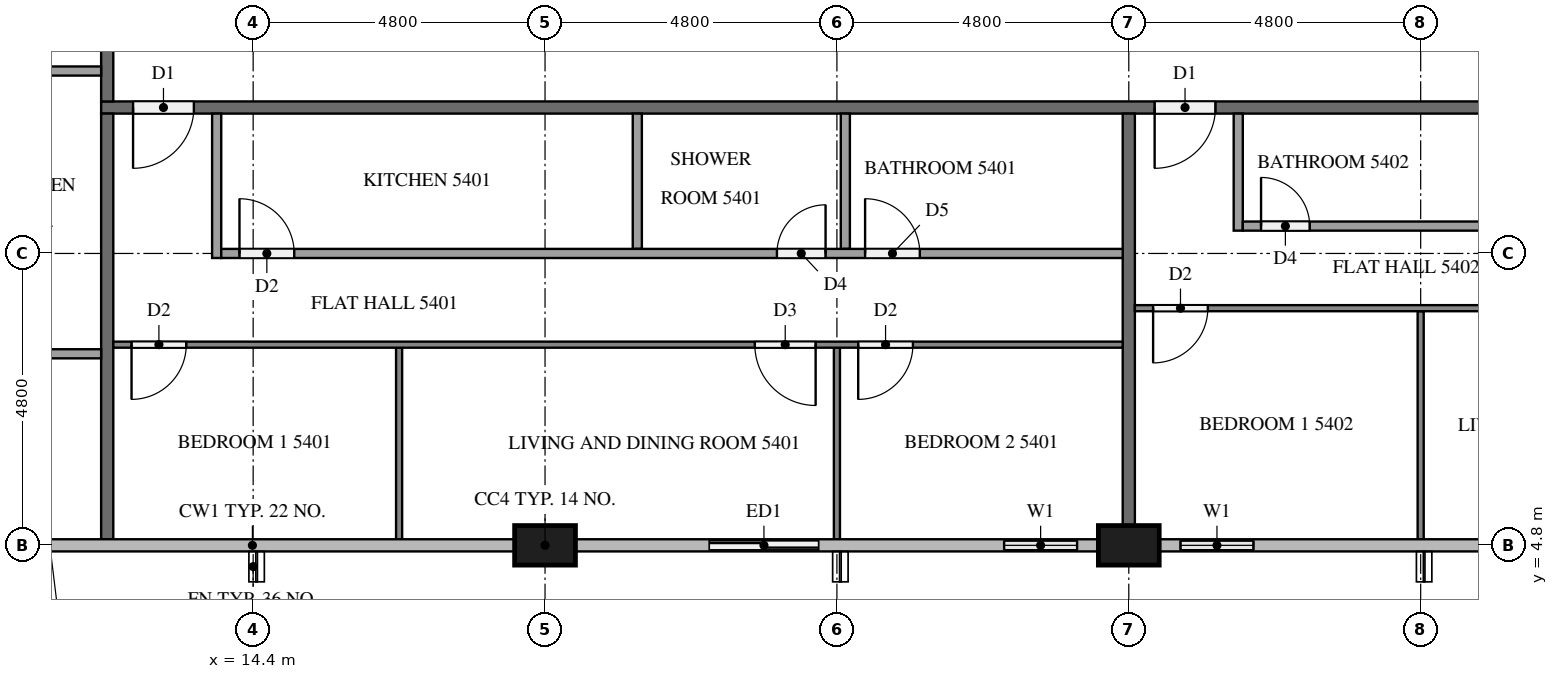
"""IFC4 building model, lengths in metres.
Left out: names, types, materials, properties, quantities, classifications, styles, units other than length and angle.
Written with IfcOpenShell. Run it as: python <this file> out.ifc"""

import sys

from ifc_helpers import new_model, si_unit, direction, frame, frame_2d, origin, origin_2d, place, context, subcontext, project, spatial, rectangle, extrude, element, fill, save


model = new_model("IFC4")
c1 = context("Model", 3, precision=1e-05, world=origin(), true_north=direction((0.0, 1.0)))
c2 = subcontext(c1, "Body", "Model", "MODEL_VIEW")
j1 = project(units=[si_unit("LENGTHUNIT", "METRE"), si_unit("PLANEANGLEUNIT", "RADIAN")], contexts=[c1])
p1 = place(None, origin())
s1 = spatial("IfcSite", under=j1, at=p1, CompositionType="ELEMENT")
p2 = place(p1, origin())
s2 = spatial("IfcBuilding", under=s1, at=p2, CompositionType="ELEMENT")
p3 = place(p2, frame((0.0, 0.0, 208.8)))
s3 = spatial("IfcBuildingStorey", under=s2, at=p3, CompositionType="ELEMENT", Elevation=208.8)
for number, where, z_axis, x_axis in (
    (1, (19.2, 4.8, 0.0), (0.0, 0.0, 1.0), (1.0, 0.0, 0.0)),
    (2, (28.8, 4.8, 0.0), (0.0, 0.0, 1.0), (1.0, 0.0, 0.0)),
):
    element("IfcColumn", number, at=place(p3, frame(where, z_axis=z_axis, x_axis=x_axis)), inside=s3, PredefinedType="COLUMN", context=c2, shape_type="SweptSolid", body=[
        extrude(rectangle(XDim=1.0, YDim=0.65, at=origin_2d()), origin(), (0.0, 0.0, 1.0), 3.2),
    ])
p4 = place(p3, frame((21.6, 4.8, 0.0), z_axis=(0.0, 0.0, 1.0), x_axis=(1.0, 0.0, 0.0)))
e3 = element("IfcWall", 3, at=p4, inside=s3, PredefinedType="SOLIDWALL", context=c2, shape_type="SweptSolid", body=[
    extrude(rectangle(XDim=2.4, YDim=0.15, at=frame_2d((1.2, 0.0))), origin(), (0.0, 0.0, 1.0), 3.2),
])
p5 = place(p4, frame((0.3, 0.0, 0.0)))
e4 = element("IfcOpeningElement", 4, at=p5, cuts=e3, PredefinedType="OPENING", context=c2, shape_type="SweptSolid", body=[
    extrude(rectangle(XDim=1.8, YDim=2.4, at=frame_2d((0.9, 1.2))), frame((0.0, 0.085, 0.0), z_axis=(0.0, -1.0, 0.0), x_axis=(1.0, 0.0, 0.0)), (0.0, 0.0, 1.0), 0.17),
])
p6 = place(p3, frame((26.4, 4.8, 0.0), z_axis=(0.0, 0.0, 1.0), x_axis=(1.0, 0.0, 0.0)))
e5 = element("IfcWall", 5, at=p6, inside=s3, PredefinedType="SOLIDWALL", context=c2, shape_type="SweptSolid", body=[
    extrude(rectangle(XDim=1.9, YDim=0.15, at=frame_2d((0.95, 0.0))), origin(), (0.0, 0.0, 1.0), 3.2),
])
p7 = place(p6, frame((0.35, 0.0, 0.9)))
e6 = element("IfcOpeningElement", 6, at=p7, cuts=e5, PredefinedType="OPENING", context=c2, shape_type="SweptSolid", body=[
    extrude(rectangle(XDim=1.2, YDim=1.4, at=frame_2d((0.6, 0.7))), frame((0.0, 0.085, 0.0), z_axis=(0.0, -1.0, 0.0), x_axis=(1.0, 0.0, 0.0)), (0.0, 0.0, 1.0), 0.17),
])
p8 = place(p3, frame((29.3, 4.8, 0.0), z_axis=(0.0, 0.0, 1.0), x_axis=(1.0, 0.0, 0.0)))
e7 = element("IfcWall", 7, at=p8, inside=s3, PredefinedType="SOLIDWALL", context=c2, shape_type="SweptSolid", body=[
    extrude(rectangle(XDim=1.9, YDim=0.15, at=frame_2d((0.95, 0.0))), origin(), (0.0, 0.0, 1.0), 3.2),
])
p9 = place(p8, frame((0.35, 0.0, 0.9)))
e8 = element("IfcOpeningElement", 8, at=p9, cuts=e7, PredefinedType="OPENING", context=c2, shape_type="SweptSolid", body=[
    extrude(rectangle(XDim=1.2, YDim=1.4, at=frame_2d((0.6, 0.7))), frame((0.0, 0.085, 0.0), z_axis=(0.0, -1.0, 0.0), x_axis=(1.0, 0.0, 0.0)), (0.0, 0.0, 1.0), 0.17),
])
p10 = place(p3, frame((50.5, 12.0, 0.0), z_axis=(0.0, 0.0, 1.0), x_axis=(-1.0, 0.0, 0.0)))
e9 = element("IfcWall", 9, at=p10, inside=s3, PredefinedType="PARTITIONING", context=c2, shape_type="SweptSolid", body=[
    extrude(rectangle(XDim=38.6, YDim=0.2, at=frame_2d((19.3, 0.0))), origin(), (0.0, 0.0, 1.0), 3.2),
])
p11 = place(p10, frame((37.075, 0.0, 0.0)))
e10 = element("IfcOpeningElement", 10, at=p11, cuts=e9, PredefinedType="OPENING", context=c2, shape_type="SweptSolid", body=[
    extrude(rectangle(XDim=1.0, YDim=2.1, at=frame_2d((0.5, 1.05))), frame((0.0, 0.11, 0.0), z_axis=(0.0, -1.0, 0.0), x_axis=(1.0, 0.0, 0.0)), (0.0, 0.0, 1.0), 0.22),
])
p12 = place(p10, frame((20.275, 0.0, 0.0)))
e11 = element("IfcOpeningElement", 11, at=p12, cuts=e9, PredefinedType="OPENING", context=c2, shape_type="SweptSolid", body=[
    extrude(rectangle(XDim=1.0, YDim=2.1, at=frame_2d((0.5, 1.05))), frame((0.0, 0.11, 0.0), z_axis=(0.0, -1.0, 0.0), x_axis=(1.0, 0.0, 0.0)), (0.0, 0.0, 1.0), 0.22),
])
p13 = place(p10, frame((0.525, 0.0, 0.0)))
e12 = element("IfcOpeningElement", 12, at=p13, cuts=e9, PredefinedType="OPENING", context=c2, shape_type="SweptSolid", body=[
    extrude(rectangle(XDim=1.0, YDim=2.1, at=frame_2d((0.5, 1.05))), frame((0.0, 0.11, 0.0), z_axis=(0.0, -1.0, 0.0), x_axis=(1.0, 0.0, 0.0)), (0.0, 0.0, 1.0), 0.22),
])
p14 = place(p3, frame((12.0, 12.1, 0.0), z_axis=(0.0, 0.0, 1.0), x_axis=(0.0, 1.0, 0.0)))
e13 = element("IfcWall", 13, at=p14, inside=s3, PredefinedType="PARTITIONING", context=c2, shape_type="SweptSolid", body=[
    extrude(rectangle(XDim=28.6, YDim=0.2, at=frame_2d((14.3, 0.0))), origin(), (0.0, 0.0, 1.0), 3.2),
])
p15 = place(p14, frame((27.275, 0.0, 0.0)))
e14 = element("IfcOpeningElement", 14, at=p15, cuts=e13, PredefinedType="OPENING", context=c2, shape_type="SweptSolid", body=[
    extrude(rectangle(XDim=1.0, YDim=2.1, at=frame_2d((0.5, 1.05))), frame((0.0, 0.11, 0.0), z_axis=(0.0, -1.0, 0.0), x_axis=(1.0, 0.0, 0.0)), (0.0, 0.0, 1.0), 0.22),
])
p16 = place(p14, frame((12.325, 0.0, 0.0)))
e15 = element("IfcOpeningElement", 15, at=p16, cuts=e13, PredefinedType="OPENING", context=c2, shape_type="SweptSolid", body=[
    extrude(rectangle(XDim=1.0, YDim=2.1, at=frame_2d((0.5, 1.05))), frame((0.0, 0.11, 0.0), z_axis=(0.0, -1.0, 0.0), x_axis=(1.0, 0.0, 0.0)), (0.0, 0.0, 1.0), 0.22),
])
p17 = place(p14, frame((2.725, 0.0, 0.0)))
e16 = element("IfcOpeningElement", 16, at=p17, cuts=e13, PredefinedType="OPENING", context=c2, shape_type="SweptSolid", body=[
    extrude(rectangle(XDim=1.0, YDim=2.1, at=frame_2d((0.5, 1.05))), frame((0.0, 0.11, 0.0), z_axis=(0.0, -1.0, 0.0), x_axis=(1.0, 0.0, 0.0)), (0.0, 0.0, 1.0), 0.22),
])
p18 = place(p14, frame((0.875, 0.0, 0.0)))
e17 = element("IfcOpeningElement", 17, at=p18, cuts=e13, PredefinedType="OPENING", context=c2, shape_type="SweptSolid", body=[
    extrude(rectangle(XDim=1.0, YDim=2.1, at=frame_2d((0.5, 1.05))), frame((0.0, 0.11, 0.0), z_axis=(0.0, -1.0, 0.0), x_axis=(1.0, 0.0, 0.0)), (0.0, 0.0, 1.0), 0.22),
])
p19 = place(p3, frame((28.8, 11.9, 0.0), z_axis=(0.0, 0.0, 1.0), x_axis=(0.0, -1.0, 0.0)))
e18 = element("IfcWall", 18, at=p19, inside=s3, PredefinedType="PARTITIONING", context=c2, shape_type="SweptSolid", body=[
    extrude(rectangle(XDim=6.775, YDim=0.2, at=frame_2d((3.387, 0.0))), origin(), (0.0, 0.0, 1.0), 3.2),
])
p20 = place(p3, frame((12.0, 4.9, 0.0), z_axis=(0.0, 0.0, 1.0), x_axis=(0.0, 1.0, 0.0)))
e19 = element("IfcWall", 19, at=p20, inside=s3, PredefinedType="PARTITIONING", context=c2, shape_type="SweptSolid", body=[
    extrude(rectangle(XDim=7.0, YDim=0.2, at=frame_2d((3.5, 0.0))), origin(), (0.0, 0.0, 1.0), 3.2),
])
for number, where, z_axis, x_axis in (
    (20, (16.8, 8.05, 0.0), (0.0, 0.0, 1.0), (0.0, -1.0, 0.0)),
    (21, (24.0, 8.05, 0.0), (0.0, 0.0, 1.0), (0.0, -1.0, 0.0)),
):
    element("IfcWall", number, at=place(p3, frame(where, z_axis=z_axis, x_axis=x_axis)), inside=s3, PredefinedType="PARTITIONING", context=c2, shape_type="SweptSolid", body=[
        extrude(rectangle(XDim=3.15, YDim=0.1, at=frame_2d((1.575, 0.0))), origin(), (0.0, 0.0, 1.0), 3.2),
    ])
p21 = place(p3, frame((28.7, 8.1, 0.0), z_axis=(0.0, 0.0, 1.0), x_axis=(-1.0, 0.0, 0.0)))
e22 = element("IfcWall", 22, at=p21, inside=s3, PredefinedType="PARTITIONING", context=c2, shape_type="SweptSolid", body=[
    extrude(rectangle(XDim=16.6, YDim=0.1, at=frame_2d((8.3, 0.0))), origin(), (0.0, 0.0, 1.0), 3.2),
])
p22 = place(p21, frame((15.4, 0.0, 0.0)))
e23 = element("IfcOpeningElement", 23, at=p22, cuts=e22, PredefinedType="OPENING", context=c2, shape_type="SweptSolid", body=[
    extrude(rectangle(XDim=0.9, YDim=2.1, at=frame_2d((0.45, 1.05))), frame((0.0, 0.06, 0.0), z_axis=(0.0, -1.0, 0.0), x_axis=(1.0, 0.0, 0.0)), (0.0, 0.0, 1.0), 0.12),
])
p23 = place(p21, frame((5.05, 0.0, 0.0)))
e24 = element("IfcOpeningElement", 24, at=p23, cuts=e22, PredefinedType="OPENING", context=c2, shape_type="SweptSolid", body=[
    extrude(rectangle(XDim=1.0, YDim=2.1, at=frame_2d((0.5, 1.05))), frame((0.0, 0.06, 0.0), z_axis=(0.0, -1.0, 0.0), x_axis=(1.0, 0.0, 0.0)), (0.0, 0.0, 1.0), 0.12),
])
p24 = place(p21, frame((3.45, 0.0, 0.0)))
e25 = element("IfcOpeningElement", 25, at=p24, cuts=e22, PredefinedType="OPENING", context=c2, shape_type="SweptSolid", body=[
    extrude(rectangle(XDim=0.9, YDim=2.1, at=frame_2d((0.45, 1.05))), frame((0.0, 0.06, 0.0), z_axis=(0.0, -1.0, 0.0), x_axis=(1.0, 0.0, 0.0)), (0.0, 0.0, 1.0), 0.12),
])
for number, where, z_axis, x_axis in (
    (26, (20.717, 11.9, 0.0), (0.0, 0.0, 1.0), (0.0, -1.0, 0.0)),
    (27, (24.138, 11.9, 0.0), (0.0, 0.0, 1.0), (0.0, -1.0, 0.0)),
):
    element("IfcWall", number, at=place(p3, frame(where, z_axis=z_axis, x_axis=x_axis)), inside=s3, PredefinedType="PARTITIONING", context=c2, shape_type="SweptSolid", body=[
        extrude(rectangle(XDim=2.225, YDim=0.15, at=frame_2d((1.112, 0.0))), origin(), (0.0, 0.0, 1.0), 3.2),
    ])
p25 = place(p3, frame((13.8, 11.9, 0.0), z_axis=(0.0, 0.0, 1.0), x_axis=(0.0, -1.0, 0.0)))
e28 = element("IfcWall", 28, at=p25, inside=s3, PredefinedType="PARTITIONING", context=c2, shape_type="SweptSolid", body=[
    extrude(rectangle(XDim=2.375, YDim=0.15, at=frame_2d((1.188, 0.0))), origin(), (0.0, 0.0, 1.0), 3.2),
])
p26 = place(p3, frame((13.875, 9.6, 0.0), z_axis=(0.0, 0.0, 1.0), x_axis=(1.0, 0.0, 0.0)))
e29 = element("IfcWall", 29, at=p26, inside=s3, PredefinedType="PARTITIONING", context=c2, shape_type="SweptSolid", body=[
    extrude(rectangle(XDim=14.825, YDim=0.15, at=frame_2d((7.413, 0.0))), origin(), (0.0, 0.0, 1.0), 3.2),
])
p27 = place(p26, frame((0.3, 0.0, 0.0)))
e30 = element("IfcOpeningElement", 30, at=p27, cuts=e29, PredefinedType="OPENING", context=c2, shape_type="SweptSolid", body=[
    extrude(rectangle(XDim=0.9, YDim=2.1, at=frame_2d((0.45, 1.05))), frame((0.0, 0.085, 0.0), z_axis=(0.0, -1.0, 0.0), x_axis=(1.0, 0.0, 0.0)), (0.0, 0.0, 1.0), 0.17),
])
p28 = place(p26, frame((9.138, 0.0, 0.0)))
e31 = element("IfcOpeningElement", 31, at=p28, cuts=e29, PredefinedType="OPENING", context=c2, shape_type="SweptSolid", body=[
    extrude(rectangle(XDim=0.8, YDim=2.1, at=frame_2d((0.4, 1.05))), frame((0.0, 0.085, 0.0), z_axis=(0.0, -1.0, 0.0), x_axis=(1.0, 0.0, 0.0)), (0.0, 0.0, 1.0), 0.17),
])
p29 = place(p26, frame((10.588, 0.0, 0.0)))
e32 = element("IfcOpeningElement", 32, at=p29, cuts=e29, PredefinedType="OPENING", context=c2, shape_type="SweptSolid", body=[
    extrude(rectangle(XDim=0.9, YDim=2.1, at=frame_2d((0.45, 1.05))), frame((0.0, 0.085, 0.0), z_axis=(0.0, -1.0, 0.0), x_axis=(1.0, 0.0, 0.0)), (0.0, 0.0, 1.0), 0.17),
])
p30 = place(p3, frame((33.6, 8.65, 0.0), z_axis=(0.0, 0.0, 1.0), x_axis=(0.0, -1.0, 0.0)))
e33 = element("IfcWall", 33, at=p30, inside=s3, PredefinedType="PARTITIONING", context=c2, shape_type="SweptSolid", body=[
    extrude(rectangle(XDim=3.75, YDim=0.1, at=frame_2d((1.875, 0.0))), origin(), (0.0, 0.0, 1.0), 3.2),
])
p31 = place(p3, frame((40.7, 8.7, 0.0), z_axis=(0.0, 0.0, 1.0), x_axis=(-1.0, 0.0, 0.0)))
e34 = element("IfcWall", 34, at=p31, inside=s3, PredefinedType="PARTITIONING", context=c2, shape_type="SweptSolid", body=[
    extrude(rectangle(XDim=11.8, YDim=0.1, at=frame_2d((5.9, 0.0))), origin(), (0.0, 0.0, 1.0), 3.2),
])
p32 = place(p31, frame((10.6, 0.0, 0.0)))
e35 = element("IfcOpeningElement", 35, at=p32, cuts=e34, PredefinedType="OPENING", context=c2, shape_type="SweptSolid", body=[
    extrude(rectangle(XDim=0.9, YDim=2.1, at=frame_2d((0.45, 1.05))), frame((0.0, 0.06, 0.0), z_axis=(0.0, -1.0, 0.0), x_axis=(1.0, 0.0, 0.0)), (0.0, 0.0, 1.0), 0.12),
])
p33 = place(p31, frame((0.3, 0.0, 0.0)))
e36 = element("IfcOpeningElement", 36, at=p33, cuts=e34, PredefinedType="OPENING", context=c2, shape_type="SweptSolid", body=[
    extrude(rectangle(XDim=1.0, YDim=2.1, at=frame_2d((0.5, 1.05))), frame((0.0, 0.06, 0.0), z_axis=(0.0, -1.0, 0.0), x_axis=(1.0, 0.0, 0.0)), (0.0, 0.0, 1.0), 0.12),
])
p34 = place(p3, frame((30.6, 11.9, 0.0), z_axis=(0.0, 0.0, 1.0), x_axis=(0.0, -1.0, 0.0)))
e37 = element("IfcWall", 37, at=p34, inside=s3, PredefinedType="PARTITIONING", context=c2, shape_type="SweptSolid", body=[
    extrude(rectangle(XDim=1.925, YDim=0.15, at=frame_2d((0.962, 0.0))), origin(), (0.0, 0.0, 1.0), 3.2),
])
p35 = place(p3, frame((30.675, 10.05, 0.0), z_axis=(0.0, 0.0, 1.0), x_axis=(1.0, 0.0, 0.0)))
e38 = element("IfcWall", 38, at=p35, inside=s3, PredefinedType="PARTITIONING", context=c2, shape_type="SweptSolid", body=[
    extrude(rectangle(XDim=10.025, YDim=0.15, at=frame_2d((5.012, 0.0))), origin(), (0.0, 0.0, 1.0), 3.2),
])
p36 = place(p35, frame((0.3, 0.0, 0.0)))
e39 = element("IfcOpeningElement", 39, at=p36, cuts=e38, PredefinedType="OPENING", context=c2, shape_type="SweptSolid", body=[
    extrude(rectangle(XDim=0.8, YDim=2.1, at=frame_2d((0.4, 1.05))), frame((0.0, 0.085, 0.0), z_axis=(0.0, -1.0, 0.0), x_axis=(1.0, 0.0, 0.0)), (0.0, 0.0, 1.0), 0.17),
])
p37 = place(p35, frame((8.775, 0.0, 0.0)))
e40 = element("IfcOpeningElement", 40, at=p37, cuts=e38, PredefinedType="OPENING", context=c2, shape_type="SweptSolid", body=[
    extrude(rectangle(XDim=0.9, YDim=2.1, at=frame_2d((0.45, 1.05))), frame((0.0, 0.085, 0.0), z_axis=(0.0, -1.0, 0.0), x_axis=(1.0, 0.0, 0.0)), (0.0, 0.0, 1.0), 0.17),
])
p38 = place(p3, frame((11.9, 7.95, 0.0), z_axis=(0.0, 0.0, 1.0), x_axis=(-1.0, 0.0, 0.0)))
e41 = element("IfcWall", 41, at=p38, inside=s3, PredefinedType="PARTITIONING", context=c2, shape_type="SweptSolid", body=[
    extrude(rectangle(XDim=2.075, YDim=0.15, at=frame_2d((1.038, 0.0))), origin(), (0.0, 0.0, 1.0), 3.2),
])
p39 = place(p3, frame((11.9, 12.6, 0.0), z_axis=(0.0, 0.0, 1.0), x_axis=(-1.0, 0.0, 0.0)))
e42 = element("IfcWall", 42, at=p39, inside=s3, PredefinedType="PARTITIONING", context=c2, shape_type="SweptSolid", body=[
    extrude(rectangle(XDim=2.225, YDim=0.15, at=frame_2d((1.112, 0.0))), origin(), (0.0, 0.0, 1.0), 3.2),
])
p40 = place(p5, origin())
e43 = element("IfcDoor", 43, at=p40, inside=s3, OperationType="SLIDING_TO_LEFT", PredefinedType="DOOR", context=c2, shape_type="SweptSolid", body=[
    extrude(rectangle(XDim=1.8, YDim=2.4, at=frame_2d((0.9, 1.2))), frame((0.0, 0.025, 0.0), z_axis=(0.0, -1.0, 0.0), x_axis=(1.0, 0.0, 0.0)), (0.0, 0.0, 1.0), 0.05),
])
fill(e4, e43)
p41 = place(p7, origin())
e44 = element("IfcWindow", 44, at=p41, inside=s3, PartitioningType="SINGLE_PANEL", PredefinedType="WINDOW", context=c2, shape_type="SweptSolid", body=[
    extrude(rectangle(XDim=1.2, YDim=1.4, at=frame_2d((0.6, 0.7))), frame((0.0, 0.03, 0.0), z_axis=(0.0, -1.0, 0.0), x_axis=(1.0, 0.0, 0.0)), (0.0, 0.0, 1.0), 0.06),
])
fill(e6, e44)
p42 = place(p9, origin())
e45 = element("IfcWindow", 45, at=p42, inside=s3, PartitioningType="SINGLE_PANEL", PredefinedType="WINDOW", context=c2, shape_type="SweptSolid", body=[
    extrude(rectangle(XDim=1.2, YDim=1.4, at=frame_2d((0.6, 0.7))), frame((0.0, 0.03, 0.0), z_axis=(0.0, -1.0, 0.0), x_axis=(1.0, 0.0, 0.0)), (0.0, 0.0, 1.0), 0.06),
])
fill(e8, e45)
p43 = place(p11, origin())
e46 = element("IfcDoor", 46, at=p43, inside=s3, OperationType="SINGLE_SWING_RIGHT", PredefinedType="DOOR", context=c2, shape_type="SweptSolid", body=[
    extrude(rectangle(XDim=1.0, YDim=2.1, at=frame_2d((0.5, 1.05))), frame((0.0, 0.025, 0.0), z_axis=(0.0, -1.0, 0.0), x_axis=(1.0, 0.0, 0.0)), (0.0, 0.0, 1.0), 0.05),
])
fill(e10, e46)
p44 = place(p12, origin())
e47 = element("IfcDoor", 47, at=p44, inside=s3, OperationType="SINGLE_SWING_RIGHT", PredefinedType="DOOR", context=c2, shape_type="SweptSolid", body=[
    extrude(rectangle(XDim=1.0, YDim=2.1, at=frame_2d((0.5, 1.05))), frame((0.0, 0.025, 0.0), z_axis=(0.0, -1.0, 0.0), x_axis=(1.0, 0.0, 0.0)), (0.0, 0.0, 1.0), 0.05),
])
fill(e11, e47)
p45 = place(p22, origin())
e48 = element("IfcDoor", 48, at=p45, inside=s3, OperationType="SINGLE_SWING_RIGHT", PredefinedType="DOOR", context=c2, shape_type="SweptSolid", body=[
    extrude(rectangle(XDim=0.9, YDim=2.1, at=frame_2d((0.45, 1.05))), frame((0.0, 0.025, 0.0), z_axis=(0.0, -1.0, 0.0), x_axis=(1.0, 0.0, 0.0)), (0.0, 0.0, 1.0), 0.05),
])
fill(e23, e48)
p46 = place(p23, origin())
e49 = element("IfcDoor", 49, at=p46, inside=s3, OperationType="SINGLE_SWING_LEFT", PredefinedType="DOOR", context=c2, shape_type="SweptSolid", body=[
    extrude(rectangle(XDim=1.0, YDim=2.1, at=frame_2d((0.5, 1.05))), frame((0.0, 0.025, 0.0), z_axis=(0.0, -1.0, 0.0), x_axis=(1.0, 0.0, 0.0)), (0.0, 0.0, 1.0), 0.05),
])
fill(e24, e49)
p47 = place(p24, origin())
e50 = element("IfcDoor", 50, at=p47, inside=s3, OperationType="SINGLE_SWING_RIGHT", PredefinedType="DOOR", context=c2, shape_type="SweptSolid", body=[
    extrude(rectangle(XDim=0.9, YDim=2.1, at=frame_2d((0.45, 1.05))), frame((0.0, 0.025, 0.0), z_axis=(0.0, -1.0, 0.0), x_axis=(1.0, 0.0, 0.0)), (0.0, 0.0, 1.0), 0.05),
])
fill(e25, e50)
p48 = place(p27, origin())
e51 = element("IfcDoor", 51, at=p48, inside=s3, OperationType="SINGLE_SWING_LEFT", PredefinedType="DOOR", context=c2, shape_type="SweptSolid", body=[
    extrude(rectangle(XDim=0.9, YDim=2.1, at=frame_2d((0.45, 1.05))), frame((0.0, 0.025, 0.0), z_axis=(0.0, -1.0, 0.0), x_axis=(1.0, 0.0, 0.0)), (0.0, 0.0, 1.0), 0.05),
])
fill(e30, e51)
p49 = place(p28, origin())
e52 = element("IfcDoor", 52, at=p49, inside=s3, OperationType="SINGLE_SWING_RIGHT", PredefinedType="DOOR", context=c2, shape_type="SweptSolid", body=[
    extrude(rectangle(XDim=0.8, YDim=2.1, at=frame_2d((0.4, 1.05))), frame((0.0, 0.025, 0.0), z_axis=(0.0, -1.0, 0.0), x_axis=(1.0, 0.0, 0.0)), (0.0, 0.0, 1.0), 0.05),
])
fill(e31, e52)
p50 = place(p29, origin())
e53 = element("IfcDoor", 53, at=p50, inside=s3, OperationType="SINGLE_SWING_LEFT", PredefinedType="DOOR", context=c2, shape_type="SweptSolid", body=[
    extrude(rectangle(XDim=0.9, YDim=2.1, at=frame_2d((0.45, 1.05))), frame((0.0, 0.025, 0.0), z_axis=(0.0, -1.0, 0.0), x_axis=(1.0, 0.0, 0.0)), (0.0, 0.0, 1.0), 0.05),
])
fill(e32, e53)
p51 = place(p32, origin())
e54 = element("IfcDoor", 54, at=p51, inside=s3, OperationType="SINGLE_SWING_RIGHT", PredefinedType="DOOR", context=c2, shape_type="SweptSolid", body=[
    extrude(rectangle(XDim=0.9, YDim=2.1, at=frame_2d((0.45, 1.05))), frame((0.0, 0.025, 0.0), z_axis=(0.0, -1.0, 0.0), x_axis=(1.0, 0.0, 0.0)), (0.0, 0.0, 1.0), 0.05),
])
fill(e35, e54)
p52 = place(p36, origin())
e55 = element("IfcDoor", 55, at=p52, inside=s3, OperationType="SINGLE_SWING_LEFT", PredefinedType="DOOR", context=c2, shape_type="SweptSolid", body=[
    extrude(rectangle(XDim=0.8, YDim=2.1, at=frame_2d((0.4, 1.05))), frame((0.0, 0.025, 0.0), z_axis=(0.0, -1.0, 0.0), x_axis=(1.0, 0.0, 0.0)), (0.0, 0.0, 1.0), 0.05),
])
fill(e39, e55)
save(model, sys.argv[1])
